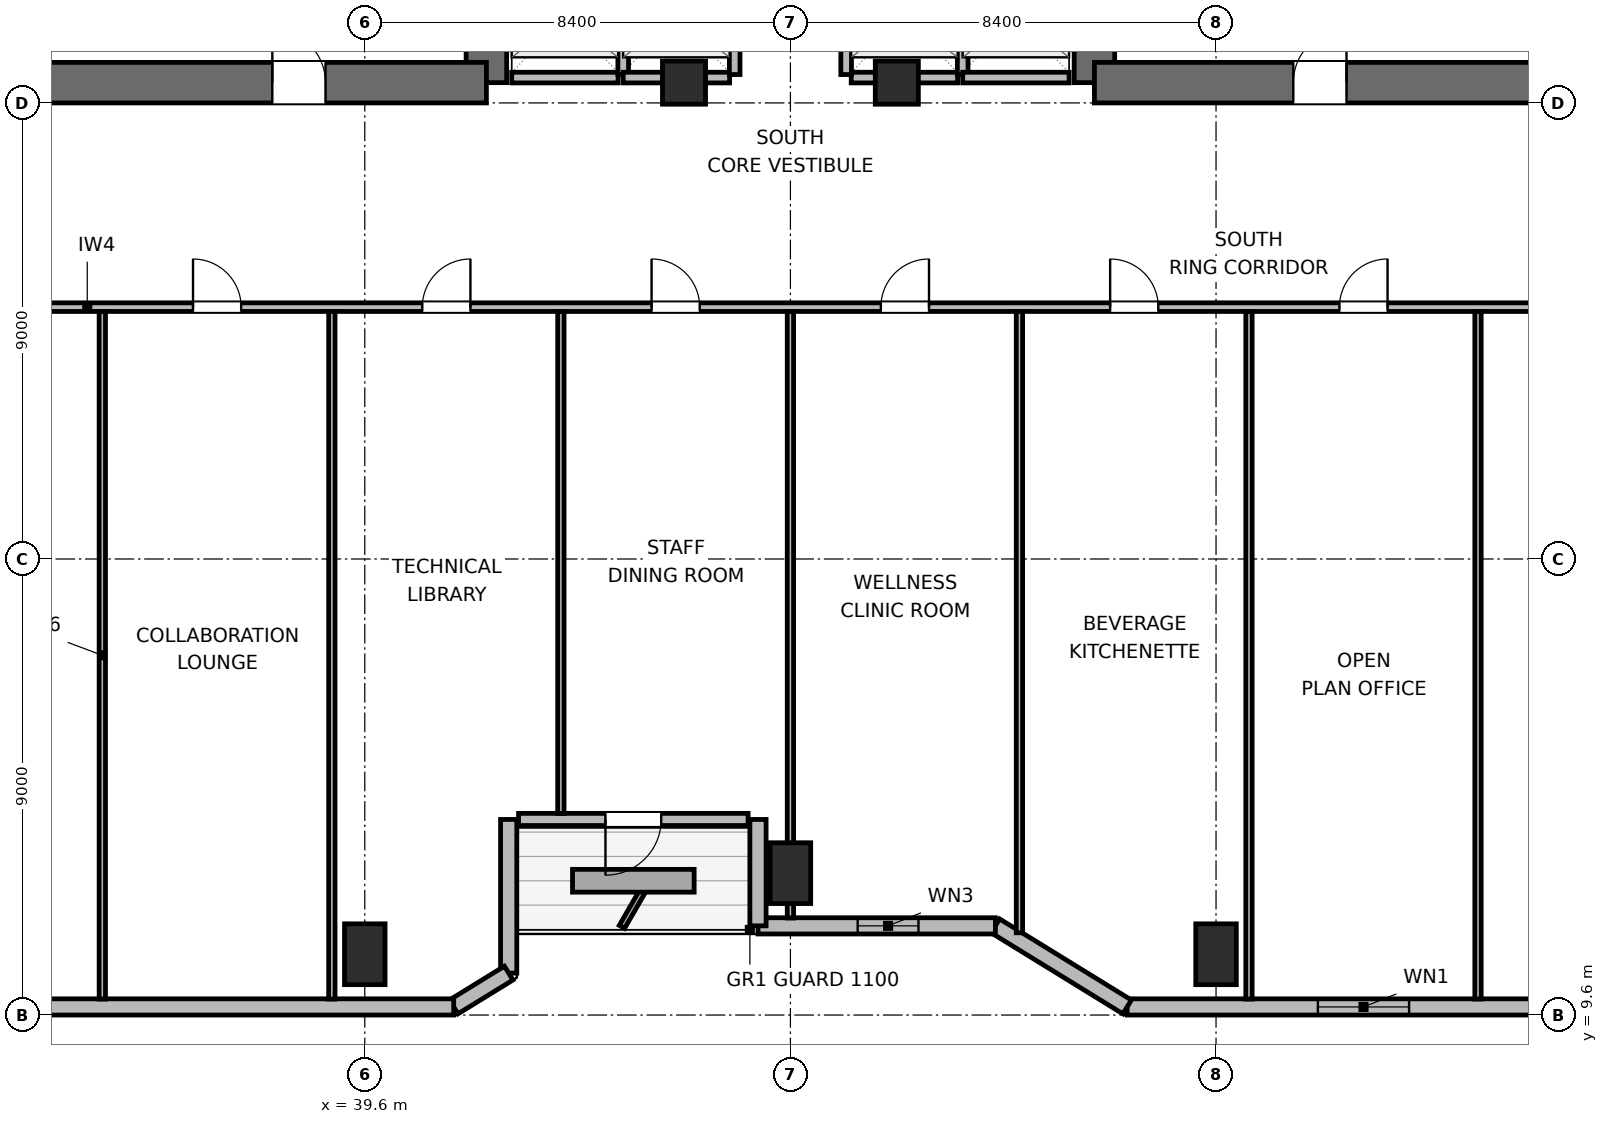
"""IFC4 building model, lengths in metres.
Left out: names, types, materials, properties, quantities, classifications, styles, units other than length and angle.
Written with IfcOpenShell. Run it as: python <this file> out.ifc"""

import sys

from ifc_helpers import new_model, si_unit, direction, frame, frame_2d, origin, origin_2d, place, context, subcontext, project, spatial, rectangle, extrude, element, fill, save


model = new_model("IFC4")
c1 = context("Model", 3, precision=1e-05, world=origin(), true_north=direction((0.0, 1.0)))
c2 = subcontext(c1, "Body", "Model", "MODEL_VIEW")
j1 = project(units=[si_unit("LENGTHUNIT", "METRE"), si_unit("PLANEANGLEUNIT", "RADIAN")], contexts=[c1])
p1 = place(None, origin())
s1 = spatial("IfcSite", under=j1, at=p1, CompositionType="ELEMENT")
p2 = place(p1, origin())
s2 = spatial("IfcBuilding", under=s1, at=p2, CompositionType="ELEMENT")
p3 = place(p2, frame((0.0, 0.0, 109.2)))
s3 = spatial("IfcBuildingStorey", under=s2, at=p3, CompositionType="ELEMENT", Elevation=109.2)
p4 = place(p3, frame((42.0, 28.0, 0.0), z_axis=(0.0, 0.0, 1.0), x_axis=(0.0, 1.0, 0.0)))
e1 = element("IfcWall", 1, at=p4, inside=s3, PredefinedType="SHEAR", context=c2, shape_type="SweptSolid", body=[
    extrude(rectangle(XDim=6.4, YDim=0.8, at=frame_2d((3.2, 0.0))), origin(), (0.0, 0.0, 1.0), 3.9),
])
p5 = place(p3, frame((32.8, 28.0, 0.0), z_axis=(0.0, 0.0, 1.0), x_axis=(1.0, 0.0, 0.0)))
e2 = element("IfcWall", 2, at=p5, inside=s3, PredefinedType="SHEAR", context=c2, shape_type="SweptSolid", body=[
    extrude(rectangle(XDim=9.2, YDim=0.8, at=frame_2d((4.6, 0.0))), origin(), (0.0, 0.0, 1.0), 3.9),
])
p6 = place(p5, frame((4.975, 0.0, 0.0)))
e3 = element("IfcOpeningElement", 3, at=p6, cuts=e2, PredefinedType="OPENING", context=c2, shape_type="SweptSolid", body=[
    extrude(rectangle(XDim=1.05, YDim=2.04, at=frame_2d((0.525, 1.02))), frame((0.0, 0.41, 0.0), z_axis=(0.0, -1.0, 0.0), x_axis=(1.0, 0.0, 0.0)), (0.0, 0.0, 1.0), 0.82),
])
p7 = place(p3, frame((54.0, 28.0, 0.0), z_axis=(0.0, 0.0, 1.0), x_axis=(0.0, 1.0, 0.0)))
e4 = element("IfcWall", 4, at=p7, inside=s3, PredefinedType="SHEAR", context=c2, shape_type="SweptSolid", body=[
    extrude(rectangle(XDim=7.8, YDim=0.8, at=frame_2d((3.9, 0.0))), origin(), (0.0, 0.0, 1.0), 3.9),
])
p8 = place(p3, frame((54.0, 28.0, 0.0), z_axis=(0.0, 0.0, 1.0), x_axis=(1.0, 0.0, 0.0)))
e5 = element("IfcWall", 5, at=p8, inside=s3, PredefinedType="SHEAR", context=c2, shape_type="SweptSolid", body=[
    extrude(rectangle(XDim=9.2, YDim=0.8, at=frame_2d((4.6, 0.0))), origin(), (0.0, 0.0, 1.0), 3.9),
])
p9 = place(p8, frame((3.925, 0.0, 0.0)))
e6 = element("IfcOpeningElement", 6, at=p9, cuts=e5, PredefinedType="OPENING", context=c2, shape_type="SweptSolid", body=[
    extrude(rectangle(XDim=1.05, YDim=2.04, at=frame_2d((0.525, 1.02))), frame((0.0, 0.41, 0.0), z_axis=(0.0, -1.0, 0.0), x_axis=(1.0, 0.0, 0.0)), (0.0, 0.0, 1.0), 0.82),
])
for number, where, z_axis, x_axis in (
    (7, (39.6, 10.8, 0.0), (0.0, 0.0, 1.0), (1.0, 0.0, 0.0)),
    (8, (48.0, 12.4, 0.0), (0.0, 0.0, 1.0), (1.0, 0.0, 0.0)),
    (9, (56.4, 10.8, 0.0), (0.0, 0.0, 1.0), (1.0, 0.0, 0.0)),
):
    element("IfcColumn", number, at=place(p3, frame(where, z_axis=z_axis, x_axis=x_axis)), inside=s3, PredefinedType="COLUMN", context=c2, shape_type="SweptSolid", body=[
        extrude(rectangle(XDim=0.8, YDim=1.2, at=origin_2d()), origin(), (0.0, 0.0, 1.0), 3.9),
    ])
for number, where, z_axis, x_axis in (
    (10, (45.9, 28.0, 0.0), (0.0, 0.0, 1.0), (1.0, 0.0, 0.0)),
    (11, (50.1, 28.0, 0.0), (0.0, 0.0, 1.0), (1.0, 0.0, 0.0)),
):
    element("IfcColumn", number, at=place(p3, frame(where, z_axis=z_axis, x_axis=x_axis)), inside=s3, PredefinedType="COLUMN", context=c2, shape_type="SweptSolid", body=[
        extrude(rectangle(XDim=0.85, YDim=0.85, at=origin_2d()), origin(), (0.0, 0.0, 1.0), 3.9),
    ])
p10 = place(p3, frame((65.379, 9.76, 0.0), z_axis=(0.0, 0.0, 1.0), x_axis=(-1.0, 0.0, 0.0)))
e12 = element("IfcWall", 12, at=p10, inside=s3, PredefinedType="SOLIDWALL", context=c2, shape_type="SweptSolid", body=[
    extrude(rectangle(XDim=10.734, YDim=0.32, at=frame_2d((5.367, 0.0))), origin(), (0.0, 0.0, 1.0), 3.64),
])
p11 = place(p10, frame((5.169, 0.0, 0.85)))
e13 = element("IfcOpeningElement", 13, at=p11, cuts=e12, PredefinedType="OPENING", context=c2, shape_type="SweptSolid", body=[
    extrude(rectangle(XDim=1.8, YDim=1.1, at=frame_2d((0.9, 0.55))), frame((0.0, 0.17, 0.0), z_axis=(0.0, -1.0, 0.0), x_axis=(1.0, 0.0, 0.0)), (0.0, 0.0, 1.0), 0.34),
])
p12 = place(p3, frame((54.645, 9.76, 0.0), z_axis=(0.0, 0.0, 1.0), x_axis=(-0.851630857047, 0.524142044989, 0.0)))
e14 = element("IfcWall", 14, at=p12, inside=s3, PredefinedType="SOLIDWALL", context=c2, shape_type="SweptSolid", body=[
    extrude(rectangle(XDim=3.053, YDim=0.32, at=frame_2d((1.526, 0.0))), origin(), (0.0, 0.0, 1.0), 2.875),
])
p13 = place(p3, frame((52.045, 11.36, 0.0), z_axis=(0.0, 0.0, 1.0), x_axis=(-1.0, 0.0, 0.0)))
e15 = element("IfcWall", 15, at=p13, inside=s3, PredefinedType="SOLIDWALL", context=c2, shape_type="SweptSolid", body=[
    extrude(rectangle(XDim=4.685, YDim=0.32, at=frame_2d((2.343, 0.0))), origin(), (0.0, 0.0, 1.0), 2.875),
])
p14 = place(p13, frame((1.518, 0.0, 0.85)))
e16 = element("IfcOpeningElement", 16, at=p14, cuts=e15, PredefinedType="OPENING", context=c2, shape_type="SweptSolid", body=[
    extrude(rectangle(XDim=1.2, YDim=1.1, at=frame_2d((0.6, 0.55))), frame((0.0, 0.17, 0.0), z_axis=(0.0, -1.0, 0.0), x_axis=(1.0, 0.0, 0.0)), (0.0, 0.0, 1.0), 0.34),
])
p15 = place(p3, frame((47.36, 11.36, 0.0), z_axis=(0.0, 0.0, 1.0), x_axis=(0.0, 1.0, 0.0)))
e17 = element("IfcWall", 17, at=p15, inside=s3, PredefinedType="SOLIDWALL", context=c2, shape_type="SweptSolid", body=[
    extrude(rectangle(XDim=2.1, YDim=0.32, at=frame_2d((1.05, 0.0))), origin(), (0.0, 0.0, 1.0), 2.875),
])
p16 = place(p3, frame((47.165, 13.46, 0.0), z_axis=(0.0, 0.0, 1.0), x_axis=(-1.0, 0.0, 0.0)))
e18 = element("IfcWall", 18, at=p16, inside=s3, PredefinedType="SOLIDWALL", context=c2, shape_type="SweptSolid", body=[
    extrude(rectangle(XDim=4.53, YDim=0.24, at=frame_2d((2.265, 0.0))), origin(), (0.0, 0.0, 1.0), 3.64),
])
p17 = place(p16, frame((1.715, 0.0, 0.0)))
e19 = element("IfcOpeningElement", 19, at=p17, cuts=e18, PredefinedType="OPENING", context=c2, shape_type="SweptSolid", body=[
    extrude(rectangle(XDim=1.1, YDim=2.04, at=frame_2d((0.55, 1.02))), frame((0.0, 0.13, 0.0), z_axis=(0.0, -1.0, 0.0), x_axis=(1.0, 0.0, 0.0)), (0.0, 0.0, 1.0), 0.26),
])
p18 = place(p3, frame((42.44, 13.46, 0.0), z_axis=(0.0, 0.0, 1.0), x_axis=(0.0, -1.0, 0.0)))
e20 = element("IfcWall", 20, at=p18, inside=s3, PredefinedType="SOLIDWALL", context=c2, shape_type="SweptSolid", body=[
    extrude(rectangle(XDim=3.032, YDim=0.32, at=frame_2d((1.516, 0.0))), origin(), (0.0, 0.0, 1.0), 2.875),
])
p19 = place(p3, frame((42.44, 10.427, 0.0), z_axis=(0.0, 0.0, 1.0), x_axis=(-0.851776724646, -0.523904964045, 0.0)))
e21 = element("IfcWall", 21, at=p19, inside=s3, PredefinedType="SOLIDWALL", context=c2, shape_type="SweptSolid", body=[
    extrude(rectangle(XDim=1.274, YDim=0.32, at=frame_2d((0.637, 0.0))), origin(), (0.0, 0.0, 1.0), 3.64),
])
p20 = place(p3, frame((41.355, 9.76, 0.0), z_axis=(0.0, 0.0, 1.0), x_axis=(-1.0, 0.0, 0.0)))
e22 = element("IfcWall", 22, at=p20, inside=s3, PredefinedType="SOLIDWALL", context=c2, shape_type="SweptSolid", body=[
    extrude(rectangle(XDim=17.934, YDim=0.32, at=frame_2d((8.967, 0.0))), origin(), (0.0, 0.0, 1.0), 3.64),
])
p21 = place(p3, frame((42.5, 28.1, 0.0), z_axis=(0.0, 0.0, 1.0), x_axis=(1.0, 0.0, 0.0)))
e23 = element("IfcWall", 23, at=p21, inside=s3, PredefinedType="PARTITIONING", context=c2, shape_type="SweptSolid", body=[
    extrude(rectangle(XDim=2.1, YDim=0.21, at=frame_2d((1.05, 0.0))), origin(), (0.0, 0.0, 1.0), 2.525),
])
p22 = place(p3, frame((44.7, 28.16, 0.0), z_axis=(0.0, 0.0, 1.0), x_axis=(0.0, 1.0, 0.0)))
e24 = element("IfcWall", 24, at=p22, inside=s3, PredefinedType="PARTITIONING", context=c2, shape_type="SweptSolid", body=[
    extrude(rectangle(XDim=2.28, YDim=0.21, at=frame_2d((1.14, 0.0))), origin(), (0.0, 0.0, 1.0), 3.64),
])
p23 = place(p3, frame((44.7, 28.1, 0.0), z_axis=(0.0, 0.0, 1.0), x_axis=(1.0, 0.0, 0.0)))
e25 = element("IfcWall", 25, at=p23, inside=s3, PredefinedType="PARTITIONING", context=c2, shape_type="SweptSolid", body=[
    extrude(rectangle(XDim=2.1, YDim=0.21, at=frame_2d((1.05, 0.0))), origin(), (0.0, 0.0, 1.0), 2.525),
])
p24 = place(p3, frame((46.9, 28.16, 0.0), z_axis=(0.0, 0.0, 1.0), x_axis=(0.0, 1.0, 0.0)))
e26 = element("IfcWall", 26, at=p24, inside=s3, PredefinedType="PARTITIONING", context=c2, shape_type="SweptSolid", body=[
    extrude(rectangle(XDim=2.28, YDim=0.21, at=frame_2d((1.14, 0.0))), origin(), (0.0, 0.0, 1.0), 3.64),
])
p25 = place(p3, frame((49.2, 28.1, 0.0), z_axis=(0.0, 0.0, 1.0), x_axis=(1.0, 0.0, 0.0)))
e27 = element("IfcWall", 27, at=p25, inside=s3, PredefinedType="PARTITIONING", context=c2, shape_type="SweptSolid", body=[
    extrude(rectangle(XDim=2.1, YDim=0.21, at=frame_2d((1.05, 0.0))), origin(), (0.0, 0.0, 1.0), 2.525),
])
for number, where, z_axis, x_axis in (
    (28, (49.1, 28.16, 0.0), (0.0, 0.0, 1.0), (0.0, 1.0, 0.0)),
    (29, (51.4, 28.16, 0.0), (0.0, 0.0, 1.0), (0.0, 1.0, 0.0)),
):
    element("IfcWall", number, at=place(p3, frame(where, z_axis=z_axis, x_axis=x_axis)), inside=s3, PredefinedType="PARTITIONING", context=c2, shape_type="SweptSolid", body=[
        extrude(rectangle(XDim=2.28, YDim=0.21, at=frame_2d((1.14, 0.0))), origin(), (0.0, 0.0, 1.0), 3.64),
    ])
p26 = place(p3, frame((51.4, 28.1, 0.0), z_axis=(0.0, 0.0, 1.0), x_axis=(1.0, 0.0, 0.0)))
e30 = element("IfcWall", 30, at=p26, inside=s3, PredefinedType="PARTITIONING", context=c2, shape_type="SweptSolid", body=[
    extrude(rectangle(XDim=2.1, YDim=0.21, at=frame_2d((1.05, 0.0))), origin(), (0.0, 0.0, 1.0), 2.525),
])
p27 = place(p3, frame((28.7, 23.57, 0.0), z_axis=(0.0, 0.0, 1.0), x_axis=(1.0, 0.0, 0.0)))
e31 = element("IfcWall", 31, at=p27, inside=s3, PredefinedType="PARTITIONING", context=c2, shape_type="SweptSolid", body=[
    extrude(rectangle(XDim=38.6, YDim=0.17, at=frame_2d((19.3, 0.0))), origin(), (0.0, 0.0, 1.0), 3.64),
])
p28 = place(p27, frame((2.385, 0.0, 0.0)))
e32 = element("IfcOpeningElement", 32, at=p28, cuts=e31, PredefinedType="OPENING", context=c2, shape_type="SweptSolid", body=[
    extrude(rectangle(XDim=0.95, YDim=2.04, at=frame_2d((0.475, 1.02))), frame((0.0, 0.095, 0.0), z_axis=(0.0, -1.0, 0.0), x_axis=(1.0, 0.0, 0.0)), (0.0, 0.0, 1.0), 0.19),
])
p29 = place(p27, frame((7.51, 0.0, 0.0)))
e33 = element("IfcOpeningElement", 33, at=p29, cuts=e31, PredefinedType="OPENING", context=c2, shape_type="SweptSolid", body=[
    extrude(rectangle(XDim=0.95, YDim=2.04, at=frame_2d((0.475, 1.02))), frame((0.0, 0.095, 0.0), z_axis=(0.0, -1.0, 0.0), x_axis=(1.0, 0.0, 0.0)), (0.0, 0.0, 1.0), 0.19),
])
p30 = place(p27, frame((12.035, 0.0, 0.0)))
e34 = element("IfcOpeningElement", 34, at=p30, cuts=e31, PredefinedType="OPENING", context=c2, shape_type="SweptSolid", body=[
    extrude(rectangle(XDim=0.95, YDim=2.04, at=frame_2d((0.475, 1.02))), frame((0.0, 0.095, 0.0), z_axis=(0.0, -1.0, 0.0), x_axis=(1.0, 0.0, 0.0)), (0.0, 0.0, 1.0), 0.19),
])
p31 = place(p27, frame((16.56, 0.0, 0.0)))
e35 = element("IfcOpeningElement", 35, at=p31, cuts=e31, PredefinedType="OPENING", context=c2, shape_type="SweptSolid", body=[
    extrude(rectangle(XDim=0.95, YDim=2.04, at=frame_2d((0.475, 1.02))), frame((0.0, 0.095, 0.0), z_axis=(0.0, -1.0, 0.0), x_axis=(1.0, 0.0, 0.0)), (0.0, 0.0, 1.0), 0.19),
])
p32 = place(p27, frame((21.085, 0.0, 0.0)))
e36 = element("IfcOpeningElement", 36, at=p32, cuts=e31, PredefinedType="OPENING", context=c2, shape_type="SweptSolid", body=[
    extrude(rectangle(XDim=0.95, YDim=2.04, at=frame_2d((0.475, 1.02))), frame((0.0, 0.095, 0.0), z_axis=(0.0, -1.0, 0.0), x_axis=(1.0, 0.0, 0.0)), (0.0, 0.0, 1.0), 0.19),
])
p33 = place(p27, frame((25.61, 0.0, 0.0)))
e37 = element("IfcOpeningElement", 37, at=p33, cuts=e31, PredefinedType="OPENING", context=c2, shape_type="SweptSolid", body=[
    extrude(rectangle(XDim=0.95, YDim=2.04, at=frame_2d((0.475, 1.02))), frame((0.0, 0.095, 0.0), z_axis=(0.0, -1.0, 0.0), x_axis=(1.0, 0.0, 0.0)), (0.0, 0.0, 1.0), 0.19),
])
p34 = place(p27, frame((30.135, 0.0, 0.0)))
e38 = element("IfcOpeningElement", 38, at=p34, cuts=e31, PredefinedType="OPENING", context=c2, shape_type="SweptSolid", body=[
    extrude(rectangle(XDim=0.95, YDim=2.04, at=frame_2d((0.475, 1.02))), frame((0.0, 0.095, 0.0), z_axis=(0.0, -1.0, 0.0), x_axis=(1.0, 0.0, 0.0)), (0.0, 0.0, 1.0), 0.19),
])
p35 = place(p27, frame((35.26, 0.0, 0.0)))
e39 = element("IfcOpeningElement", 39, at=p35, cuts=e31, PredefinedType="OPENING", context=c2, shape_type="SweptSolid", body=[
    extrude(rectangle(XDim=0.95, YDim=2.04, at=frame_2d((0.475, 1.02))), frame((0.0, 0.095, 0.0), z_axis=(0.0, -1.0, 0.0), x_axis=(1.0, 0.0, 0.0)), (0.0, 0.0, 1.0), 0.19),
])
for number, where, z_axis, x_axis in (
    (40, (34.42, 9.915, 0.0), (0.0, 0.0, 1.0), (0.0, 1.0, 0.0)),
    (41, (38.95, 9.915, 0.0), (0.0, 0.0, 1.0), (0.0, 1.0, 0.0)),
):
    element("IfcWall", number, at=place(p3, frame(where, z_axis=z_axis, x_axis=x_axis)), inside=s3, PredefinedType="PARTITIONING", context=c2, shape_type="SweptSolid", body=[
        extrude(rectangle(XDim=13.568, YDim=0.125, at=frame_2d((6.784, 0.0))), origin(), (0.0, 0.0, 1.0), 3.64),
    ])
p36 = place(p3, frame((43.47, 13.575, 0.0), z_axis=(0.0, 0.0, 1.0), x_axis=(0.0, 1.0, 0.0)))
e42 = element("IfcWall", 42, at=p36, inside=s3, PredefinedType="PARTITIONING", context=c2, shape_type="SweptSolid", body=[
    extrude(rectangle(XDim=9.908, YDim=0.125, at=frame_2d((4.954, 0.0))), origin(), (0.0, 0.0, 1.0), 3.003),
])
p37 = place(p3, frame((48.0, 11.515, 0.0), z_axis=(0.0, 0.0, 1.0), x_axis=(0.0, 1.0, 0.0)))
e43 = element("IfcWall", 43, at=p37, inside=s3, PredefinedType="PARTITIONING", context=c2, shape_type="SweptSolid", body=[
    extrude(rectangle(XDim=11.968, YDim=0.125, at=frame_2d((5.984, 0.0))), origin(), (0.0, 0.0, 1.0), 3.003),
])
p38 = place(p3, frame((52.52, 11.223, 0.0), z_axis=(0.0, 0.0, 1.0), x_axis=(0.0, 1.0, 0.0)))
e44 = element("IfcWall", 44, at=p38, inside=s3, PredefinedType="PARTITIONING", context=c2, shape_type="SweptSolid", body=[
    extrude(rectangle(XDim=12.26, YDim=0.125, at=frame_2d((6.13, 0.0))), origin(), (0.0, 0.0, 1.0), 3.003),
])
for number, where, z_axis, x_axis in (
    (45, (57.05, 9.915, 0.0), (0.0, 0.0, 1.0), (0.0, 1.0, 0.0)),
    (46, (61.57, 9.915, 0.0), (0.0, 0.0, 1.0), (0.0, 1.0, 0.0)),
):
    element("IfcWall", number, at=place(p3, frame(where, z_axis=z_axis, x_axis=x_axis)), inside=s3, PredefinedType="PARTITIONING", context=c2, shape_type="SweptSolid", body=[
        extrude(rectangle(XDim=13.568, YDim=0.125, at=frame_2d((6.784, 0.0))), origin(), (0.0, 0.0, 1.0), 3.64),
    ])
p39 = place(p11, origin())
e47 = element("IfcWindow", 47, at=p39, inside=s3, PartitioningType="SINGLE_PANEL", PredefinedType="WINDOW", context=c2, shape_type="SweptSolid", body=[
    extrude(rectangle(XDim=1.8, YDim=1.1, at=frame_2d((0.9, 0.55))), frame((0.0, 0.03, 0.0), z_axis=(0.0, -1.0, 0.0), x_axis=(1.0, 0.0, 0.0)), (0.0, 0.0, 1.0), 0.06),
])
fill(e13, e47)
p40 = place(p14, origin())
e48 = element("IfcWindow", 48, at=p40, inside=s3, PartitioningType="SINGLE_PANEL", PredefinedType="WINDOW", context=c2, shape_type="SweptSolid", body=[
    extrude(rectangle(XDim=1.2, YDim=1.1, at=frame_2d((0.6, 0.55))), frame((0.0, 0.03, 0.0), z_axis=(0.0, -1.0, 0.0), x_axis=(1.0, 0.0, 0.0)), (0.0, 0.0, 1.0), 0.06),
])
fill(e16, e48)
p41 = place(p17, origin())
e49 = element("IfcDoor", 49, at=p41, inside=s3, OperationType="SINGLE_SWING_RIGHT", PredefinedType="DOOR", context=c2, shape_type="SweptSolid", body=[
    extrude(rectangle(XDim=1.1, YDim=2.04, at=frame_2d((0.55, 1.02))), frame((0.0, 0.025, 0.0), z_axis=(0.0, -1.0, 0.0), x_axis=(1.0, 0.0, 0.0)), (0.0, 0.0, 1.0), 0.05),
])
fill(e19, e49)
p42 = place(p6, origin())
e50 = element("IfcDoor", 50, at=p42, inside=s3, OperationType="SINGLE_SWING_LEFT", PredefinedType="DOOR", context=c2, shape_type="SweptSolid", body=[
    extrude(rectangle(XDim=1.05, YDim=2.04, at=frame_2d((0.525, 1.02))), frame((0.0, 0.025, 0.0), z_axis=(0.0, -1.0, 0.0), x_axis=(1.0, 0.0, 0.0)), (0.0, 0.0, 1.0), 0.05),
])
fill(e3, e50)
p43 = place(p9, origin())
e51 = element("IfcDoor", 51, at=p43, inside=s3, OperationType="SINGLE_SWING_RIGHT", PredefinedType="DOOR", context=c2, shape_type="SweptSolid", body=[
    extrude(rectangle(XDim=1.05, YDim=2.04, at=frame_2d((0.525, 1.02))), frame((0.0, 0.025, 0.0), z_axis=(0.0, -1.0, 0.0), x_axis=(1.0, 0.0, 0.0)), (0.0, 0.0, 1.0), 0.05),
])
fill(e6, e51)
p44 = place(p29, origin())
e52 = element("IfcDoor", 52, at=p44, inside=s3, OperationType="SINGLE_SWING_LEFT", PredefinedType="DOOR", context=c2, shape_type="SweptSolid", body=[
    extrude(rectangle(XDim=0.95, YDim=2.04, at=frame_2d((0.475, 1.02))), frame((0.0, 0.025, 0.0), z_axis=(0.0, -1.0, 0.0), x_axis=(1.0, 0.0, 0.0)), (0.0, 0.0, 1.0), 0.05),
])
fill(e33, e52)
p45 = place(p30, origin())
e53 = element("IfcDoor", 53, at=p45, inside=s3, OperationType="SINGLE_SWING_RIGHT", PredefinedType="DOOR", context=c2, shape_type="SweptSolid", body=[
    extrude(rectangle(XDim=0.95, YDim=2.04, at=frame_2d((0.475, 1.02))), frame((0.0, 0.025, 0.0), z_axis=(0.0, -1.0, 0.0), x_axis=(1.0, 0.0, 0.0)), (0.0, 0.0, 1.0), 0.05),
])
fill(e34, e53)
p46 = place(p31, origin())
e54 = element("IfcDoor", 54, at=p46, inside=s3, OperationType="SINGLE_SWING_LEFT", PredefinedType="DOOR", context=c2, shape_type="SweptSolid", body=[
    extrude(rectangle(XDim=0.95, YDim=2.04, at=frame_2d((0.475, 1.02))), frame((0.0, 0.025, 0.0), z_axis=(0.0, -1.0, 0.0), x_axis=(1.0, 0.0, 0.0)), (0.0, 0.0, 1.0), 0.05),
])
fill(e35, e54)
p47 = place(p32, origin())
e55 = element("IfcDoor", 55, at=p47, inside=s3, OperationType="SINGLE_SWING_RIGHT", PredefinedType="DOOR", context=c2, shape_type="SweptSolid", body=[
    extrude(rectangle(XDim=0.95, YDim=2.04, at=frame_2d((0.475, 1.02))), frame((0.0, 0.025, 0.0), z_axis=(0.0, -1.0, 0.0), x_axis=(1.0, 0.0, 0.0)), (0.0, 0.0, 1.0), 0.05),
])
fill(e36, e55)
p48 = place(p33, origin())
e56 = element("IfcDoor", 56, at=p48, inside=s3, OperationType="SINGLE_SWING_LEFT", PredefinedType="DOOR", context=c2, shape_type="SweptSolid", body=[
    extrude(rectangle(XDim=0.95, YDim=2.04, at=frame_2d((0.475, 1.02))), frame((0.0, 0.025, 0.0), z_axis=(0.0, -1.0, 0.0), x_axis=(1.0, 0.0, 0.0)), (0.0, 0.0, 1.0), 0.05),
])
fill(e37, e56)
p49 = place(p34, origin())
e57 = element("IfcDoor", 57, at=p49, inside=s3, OperationType="SINGLE_SWING_RIGHT", PredefinedType="DOOR", context=c2, shape_type="SweptSolid", body=[
    extrude(rectangle(XDim=0.95, YDim=2.04, at=frame_2d((0.475, 1.02))), frame((0.0, 0.025, 0.0), z_axis=(0.0, -1.0, 0.0), x_axis=(1.0, 0.0, 0.0)), (0.0, 0.0, 1.0), 0.05),
])
fill(e38, e57)
save(model, sys.argv[1])
